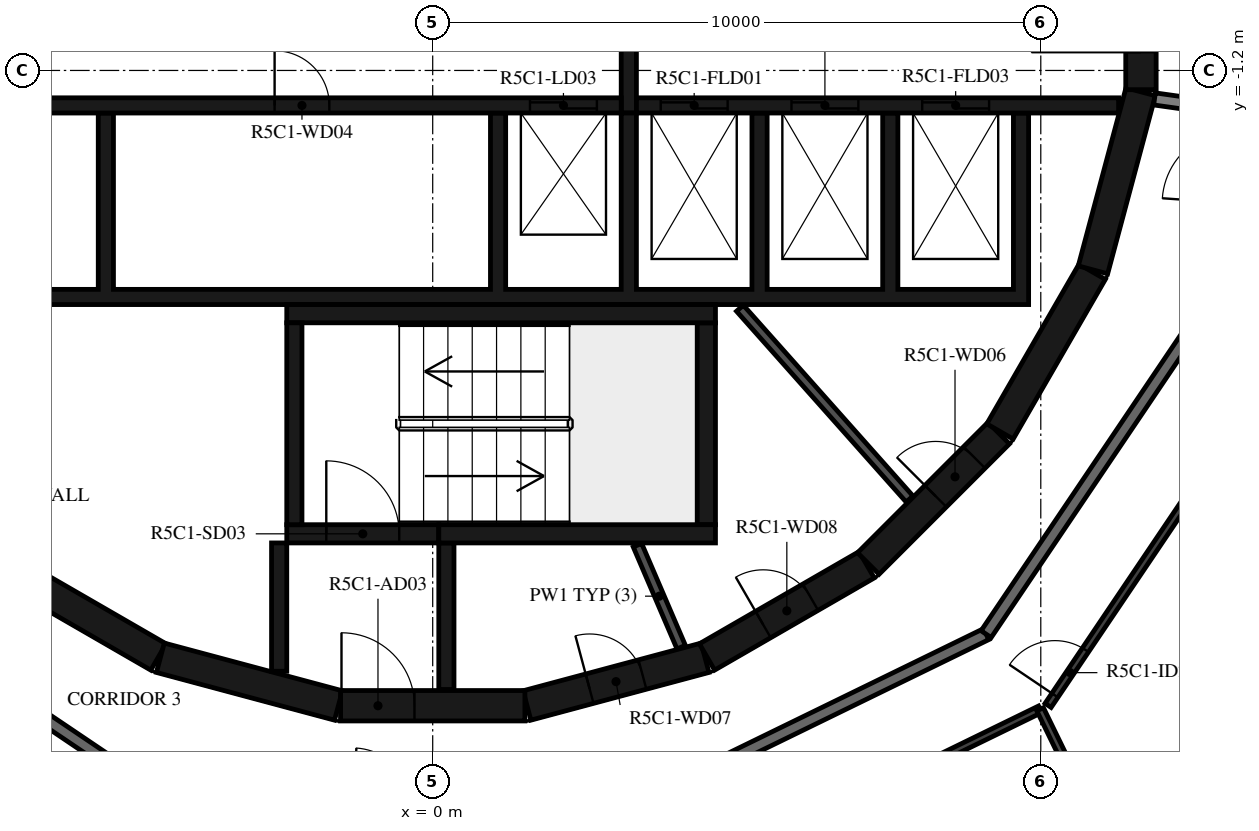
"""IFC4 building model, lengths in metres.
Left out: names, types, materials, properties, quantities, classifications, styles, units other than length and angle.
Written with IfcOpenShell. Run it as: python <this file> out.ifc"""

import sys

from ifc_helpers import new_model, si_unit, direction, frame, frame_2d, origin, place, context, subcontext, project, spatial, polyline, rectangle, outline, extrude, element, fill, save


model = new_model("IFC4")
c1 = context("Model", 3, precision=1e-05, world=origin(), true_north=direction((0.0, 1.0)))
c2 = subcontext(c1, "Body", "Model", "MODEL_VIEW")
j1 = project(units=[si_unit("LENGTHUNIT", "METRE"), si_unit("PLANEANGLEUNIT", "RADIAN")], contexts=[c1])
p1 = place(None, origin())
s1 = spatial("IfcSite", under=j1, at=p1, CompositionType="ELEMENT")
p2 = place(p1, origin())
s2 = spatial("IfcBuilding", under=s1, at=p2, CompositionType="ELEMENT")
p3 = place(p2, frame((0.0, 0.0, 212.9)))
s3 = spatial("IfcBuildingStorey", under=s2, at=p3, CompositionType="ELEMENT", Elevation=212.9)
p4 = place(p3, frame((1.55, -11.643, 0.0), z_axis=(0.0, 0.0, 1.0), x_axis=(0.965948410781, 0.258734743916, 0.0)))
e1 = element("IfcWall", 1, at=p4, inside=s3, PredefinedType="SHEAR", context=c2, shape_type="SweptSolid", body=[
    extrude(rectangle(XDim=3.033, YDim=0.5, at=frame_2d((1.516, 0.0))), origin(), (0.0, 0.0, 1.0), 3.12),
])
p5 = place(p4, frame((1.066, 0.0, 0.0)))
e2 = element("IfcOpeningElement", 2, at=p5, cuts=e1, PredefinedType="OPENING", context=c2, shape_type="SweptSolid", body=[
    extrude(rectangle(XDim=0.9, YDim=2.1, at=frame_2d((0.45, 1.05))), frame((0.0, 0.26, 0.0), z_axis=(0.0, -1.0, 0.0), x_axis=(1.0, 0.0, 0.0)), (0.0, 0.0, 1.0), 0.52),
])
p6 = place(p3, frame((4.51, -10.845, 0.0), z_axis=(0.0, 0.0, 1.0), x_axis=(0.865975092491, 0.500087131594, 0.0)))
e3 = element("IfcWall", 3, at=p6, inside=s3, PredefinedType="SHEAR", context=c2, shape_type="SweptSolid", body=[
    extrude(rectangle(XDim=3.033, YDim=0.5, at=frame_2d((1.516, 0.0))), origin(), (0.0, 0.0, 1.0), 3.12),
])
p7 = place(p6, frame((1.066, 0.0, 0.0)))
e4 = element("IfcOpeningElement", 4, at=p7, cuts=e3, PredefinedType="OPENING", context=c2, shape_type="SweptSolid", body=[
    extrude(rectangle(XDim=0.9, YDim=2.1, at=frame_2d((0.45, 1.05))), frame((0.0, 0.26, 0.0), z_axis=(0.0, -1.0, 0.0), x_axis=(1.0, 0.0, 0.0)), (0.0, 0.0, 1.0), 0.52),
])
p8 = place(p3, frame((7.164, -9.308, 0.0), z_axis=(0.0, 0.0, 1.0), x_axis=(0.707106781187, 0.707106781187, 0.0)))
e5 = element("IfcWall", 5, at=p8, inside=s3, PredefinedType="SHEAR", context=c2, shape_type="SweptSolid", body=[
    extrude(rectangle(XDim=3.032, YDim=0.5, at=frame_2d((1.516, 0.0))), origin(), (0.0, 0.0, 1.0), 3.12),
])
p9 = place(p8, frame((1.566, 0.0, 0.0)))
e6 = element("IfcOpeningElement", 6, at=p9, cuts=e5, PredefinedType="OPENING", context=c2, shape_type="SweptSolid", body=[
    extrude(rectangle(XDim=0.9, YDim=2.1, at=frame_2d((0.45, 1.05))), frame((0.0, 0.26, 0.0), z_axis=(0.0, -1.0, 0.0), x_axis=(1.0, 0.0, 0.0)), (0.0, 0.0, 1.0), 0.52),
])
for number, where, z_axis, x_axis in (
    (7, (9.329, -7.137, 0.0), (0.0, 0.0, 1.0), (0.5, 0.866, 0.0)),
    (8, (10.858, -4.479, 0.0), (0.0, 0.0, 1.0), (0.259, 0.966, 0.0)),
):
    element("IfcWall", number, at=place(p3, frame(where, z_axis=z_axis, x_axis=x_axis)), inside=s3, PredefinedType="SHEAR", context=c2, shape_type="SweptSolid", body=[
        extrude(rectangle(XDim=3.033, YDim=0.5, at=frame_2d((1.516, 0.0))), origin(), (0.0, 0.0, 1.0), 3.12),
    ])
p10 = place(p3, frame((11.647, -1.516, 0.0), z_axis=(0.0, 0.0, 1.0), x_axis=(0.0, 1.0, 0.0)))
e9 = element("IfcWall", 9, at=p10, inside=s3, PredefinedType="SHEAR", context=c2, shape_type="SweptSolid", body=[
    extrude(rectangle(XDim=3.033, YDim=0.5, at=frame_2d((1.516, 0.0))), origin(), (0.0, 0.0, 1.0), 3.12),
])
p11 = place(p10, frame((0.616, 0.0, 0.0)))
e10 = element("IfcOpeningElement", 10, at=p11, cuts=e9, PredefinedType="OPENING", context=c2, shape_type="SweptSolid", body=[
    extrude(rectangle(XDim=1.8, YDim=2.1, at=frame_2d((0.9, 1.05))), frame((0.0, 0.26, 0.0), z_axis=(0.0, -1.0, 0.0), x_axis=(1.0, 0.0, 0.0)), (0.0, 0.0, 1.0), 0.52),
])
for number, where, z_axis, x_axis in (
    (11, (-7.137, -9.329, 0.0), (0.0, 0.0, 1.0), (0.866, -0.5, 0.0)),
    (12, (-4.479, -10.858, 0.0), (0.0, 0.0, 1.0), (0.966, -0.259, 0.0)),
):
    element("IfcWall", number, at=place(p3, frame(where, z_axis=z_axis, x_axis=x_axis)), inside=s3, PredefinedType="SHEAR", context=c2, shape_type="SweptSolid", body=[
        extrude(rectangle(XDim=3.033, YDim=0.5, at=frame_2d((1.516, 0.0))), origin(), (0.0, 0.0, 1.0), 3.12),
    ])
p12 = place(p3, frame((-1.516, -11.647, 0.0), z_axis=(0.0, 0.0, 1.0), x_axis=(1.0, 0.0, 0.0)))
e13 = element("IfcWall", 13, at=p12, inside=s3, PredefinedType="SHEAR", context=c2, shape_type="SweptSolid", body=[
    extrude(rectangle(XDim=3.033, YDim=0.5, at=frame_2d((1.516, 0.0))), origin(), (0.0, 0.0, 1.0), 3.12),
])
p13 = place(p12, frame((0.016, 0.0, 0.0)))
e14 = element("IfcOpeningElement", 14, at=p13, cuts=e13, PredefinedType="OPENING", context=c2, shape_type="SweptSolid", body=[
    extrude(rectangle(XDim=1.2, YDim=2.1, at=frame_2d((0.6, 1.05))), frame((0.0, 0.26, 0.0), z_axis=(0.0, -1.0, 0.0), x_axis=(1.0, 0.0, 0.0)), (0.0, 0.0, 1.0), 0.52),
])
p14 = place(p3, frame((-2.275, -8.67, 0.0), z_axis=(0.0, 0.0, 1.0), x_axis=(0.0, 1.0, 0.0)))
e15 = element("IfcWall", 15, at=p14, inside=s3, PredefinedType="SHEAR", context=c2, shape_type="SweptSolid", body=[
    extrude(rectangle(XDim=3.32, YDim=0.25, at=frame_2d((1.66, 0.0))), origin(), (0.0, 0.0, 1.0), 3.12),
])
p15 = place(p3, frame((-2.4, -5.2, 0.0), z_axis=(0.0, 0.0, 1.0), x_axis=(1.0, 0.0, 0.0)))
e16 = element("IfcWall", 16, at=p15, inside=s3, PredefinedType="SHEAR", context=c2, shape_type="SweptSolid", body=[
    extrude(rectangle(XDim=7.05, YDim=0.3, at=frame_2d((3.525, 0.0))), origin(), (0.0, 0.0, 1.0), 3.12),
])
p16 = place(p3, frame((4.5, -8.67, 0.0), z_axis=(0.0, 0.0, 1.0), x_axis=(0.0, 1.0, 0.0)))
e17 = element("IfcWall", 17, at=p16, inside=s3, PredefinedType="SHEAR", context=c2, shape_type="SweptSolid", body=[
    extrude(rectangle(XDim=3.32, YDim=0.3, at=frame_2d((1.66, 0.0))), origin(), (0.0, 0.0, 1.0), 3.12),
])
p17 = place(p3, frame((0.1, -8.82, 0.0), z_axis=(0.0, 0.0, 1.0), x_axis=(1.0, 0.0, 0.0)))
e18 = element("IfcWall", 18, at=p17, inside=s3, PredefinedType="SHEAR", context=c2, shape_type="SweptSolid", body=[
    extrude(rectangle(XDim=4.55, YDim=0.3, at=frame_2d((2.275, 0.0))), origin(), (0.0, 0.0, 1.0), 3.12),
])
p18 = place(p3, frame((-2.4, -8.82, 0.0), z_axis=(0.0, 0.0, 1.0), x_axis=(1.0, 0.0, 0.0)))
e19 = element("IfcWall", 19, at=p18, inside=s3, PredefinedType="SHEAR", context=c2, shape_type="SweptSolid", body=[
    extrude(rectangle(XDim=2.5, YDim=0.3, at=frame_2d((1.25, 0.0))), origin(), (0.0, 0.0, 1.0), 3.12),
])
p19 = place(p18, frame((0.65, 0.0, 0.0)))
e20 = element("IfcOpeningElement", 20, at=p19, cuts=e19, PredefinedType="OPENING", context=c2, shape_type="SweptSolid", body=[
    extrude(rectangle(XDim=1.2, YDim=2.1, at=frame_2d((0.6, 1.05))), frame((0.0, 0.16, 0.0), z_axis=(0.0, -1.0, 0.0), x_axis=(1.0, 0.0, 0.0)), (0.0, 0.0, 1.0), 0.32),
])
p20 = place(p3, frame((-2.525, -8.97, 0.0), z_axis=(0.0, 0.0, 1.0), x_axis=(0.0, -1.0, 0.0)))
e21 = element("IfcWall", 21, at=p20, inside=s3, PredefinedType="SHEAR", context=c2, shape_type="SweptSolid", body=[
    extrude(rectangle(XDim=2.11, YDim=0.25, at=frame_2d((1.055, 0.0))), origin(), (0.0, 0.0, 1.0), 3.12),
])
p21 = place(p3, frame((0.225, -8.97, 0.0), z_axis=(0.0, 0.0, 1.0), x_axis=(0.0, -1.0, 0.0)))
e22 = element("IfcWall", 22, at=p21, inside=s3, PredefinedType="SHEAR", context=c2, shape_type="SweptSolid", body=[
    extrude(rectangle(XDim=2.41, YDim=0.25, at=frame_2d((1.205, 0.0))), origin(), (0.0, 0.0, 1.0), 3.12),
])
p22 = place(p3, origin())
e23 = element("IfcWall", 23, at=p22, inside=s3, PredefinedType="SHEAR", context=c2, shape_type="SweptSolid", body=[
    extrude(outline(polyline([(9.8, -5.05), (9.8, -4.8), (9.8, -1.9), (9.55, -1.9), (9.55, -4.8), (7.65, -4.8), (7.65, -1.9), (7.4, -1.9), (7.4, -4.8), (5.5, -4.8), (5.5, -1.9), (5.25, -1.9), (5.25, -4.8), (3.35, -4.8), (3.35, -1.9), (3.1, -1.9), (3.1, -4.8), (1.2, -4.8), (1.2, -1.9), (0.95, -1.9), (0.95, -4.8), (-5.25, -4.8), (-5.25, -1.9), (-5.5, -1.9), (-5.5, -4.8), (-7.4, -4.8), (-7.4, -1.9), (-7.65, -1.9), (-7.65, -4.8), (-9.55, -4.8), (-9.55, -1.9), (-9.8, -1.9), (-9.8, -4.8), (-9.8, -5.05), (9.8, -5.05)])), origin(), (0.0, 0.0, 1.0), 3.12),
])
p23 = place(p3, frame((-11.28, -1.775, 0.0), z_axis=(0.0, 0.0, 1.0), x_axis=(1.0, 0.0, 0.0)))
e24 = element("IfcWall", 24, at=p23, inside=s3, PredefinedType="SHEAR", context=c2, shape_type="SweptSolid", body=[
    extrude(rectangle(XDim=14.38, YDim=0.25, at=frame_2d((7.19, 0.0))), origin(), (0.0, 0.0, 1.0), 3.12),
])
p24 = place(p23, frame((12.88, 0.0, 0.0)))
e25 = element("IfcOpeningElement", 25, at=p24, cuts=e24, PredefinedType="OPENING", context=c2, shape_type="SweptSolid", body=[
    extrude(rectangle(XDim=1.1, YDim=2.1, at=frame_2d((0.55, 1.05))), frame((0.0, 0.135, 0.0), z_axis=(0.0, -1.0, 0.0), x_axis=(1.0, 0.0, 0.0)), (0.0, 0.0, 1.0), 0.27),
])
p25 = place(p23, frame((8.68, 0.0, 0.0)))
e26 = element("IfcOpeningElement", 26, at=p25, cuts=e24, PredefinedType="OPENING", context=c2, shape_type="SweptSolid", body=[
    extrude(rectangle(XDim=0.9, YDim=2.1, at=frame_2d((0.45, 1.05))), frame((0.0, 0.135, 0.0), z_axis=(0.0, -1.0, 0.0), x_axis=(1.0, 0.0, 0.0)), (0.0, 0.0, 1.0), 0.27),
])
p26 = place(p3, frame((3.35, -1.775, 0.0), z_axis=(0.0, 0.0, 1.0), x_axis=(1.0, 0.0, 0.0)))
e27 = element("IfcWall", 27, at=p26, inside=s3, PredefinedType="SHEAR", context=c2, shape_type="SweptSolid", body=[
    extrude(rectangle(XDim=7.93, YDim=0.25, at=frame_2d((3.965, 0.0))), origin(), (0.0, 0.0, 1.0), 3.12),
])
p27 = place(p26, frame((0.4, 0.0, 0.0)))
e28 = element("IfcOpeningElement", 28, at=p27, cuts=e27, PredefinedType="OPENING", context=c2, shape_type="SweptSolid", body=[
    extrude(rectangle(XDim=1.1, YDim=2.4, at=frame_2d((0.55, 1.2))), frame((0.0, 0.135, 0.0), z_axis=(0.0, -1.0, 0.0), x_axis=(1.0, 0.0, 0.0)), (0.0, 0.0, 1.0), 0.27),
])
p28 = place(p26, frame((2.55, 0.0, 0.0)))
e29 = element("IfcOpeningElement", 29, at=p28, cuts=e27, PredefinedType="OPENING", context=c2, shape_type="SweptSolid", body=[
    extrude(rectangle(XDim=1.1, YDim=2.4, at=frame_2d((0.55, 1.2))), frame((0.0, 0.135, 0.0), z_axis=(0.0, -1.0, 0.0), x_axis=(1.0, 0.0, 0.0)), (0.0, 0.0, 1.0), 0.27),
])
p29 = place(p26, frame((4.7, 0.0, 0.0)))
e30 = element("IfcOpeningElement", 30, at=p29, cuts=e27, PredefinedType="OPENING", context=c2, shape_type="SweptSolid", body=[
    extrude(rectangle(XDim=1.1, YDim=2.4, at=frame_2d((0.55, 1.2))), frame((0.0, 0.135, 0.0), z_axis=(0.0, -1.0, 0.0), x_axis=(1.0, 0.0, 0.0)), (0.0, 0.0, 1.0), 0.27),
])
p30 = place(p3, frame((3.225, -1.9, 0.0), z_axis=(0.0, 0.0, 1.0), x_axis=(0.0, 1.0, 0.0)))
e31 = element("IfcWall", 31, at=p30, inside=s3, PredefinedType="SHEAR", context=c2, shape_type="SweptSolid", body=[
    extrude(rectangle(XDim=3.8, YDim=0.25, at=frame_2d((1.9, 0.0))), origin(), (0.0, 0.0, 1.0), 3.12),
])
p31 = place(p3, frame((7.842, -8.248, 0.0), z_axis=(0.0, 0.0, 1.0), x_axis=(-0.66446128181, 0.747322691329, 0.0)))
e32 = element("IfcWall", 32, at=p31, inside=s3, PredefinedType="PARTITIONING", context=c2, shape_type="SweptSolid", body=[
    extrude(rectangle(XDim=4.198, YDim=0.15, at=frame_2d((2.099, 0.0))), origin(), (0.0, 0.0, 1.0), 3.12),
])
p32 = place(p3, frame((3.367, -9.007, 0.0), z_axis=(0.0, 0.0, 1.0), x_axis=(0.394387482265, -0.918944238696, 0.0)))
e33 = element("IfcWall", 33, at=p32, inside=s3, PredefinedType="PARTITIONING", context=c2, shape_type="SweptSolid", body=[
    extrude(rectangle(XDim=1.825, YDim=0.15, at=frame_2d((0.913, 0.0))), origin(), (0.0, 0.0, 1.0), 3.12),
])
p33 = place(p3, frame((13.302, -1.869, 0.0), z_axis=(0.0, 0.0, 1.0), x_axis=(-0.990274397042, 0.13912806533, 0.0)))
e34 = element("IfcWall", 34, at=p33, inside=s3, PredefinedType="STANDARD", context=c2, shape_type="SweptSolid", body=[
    extrude(rectangle(XDim=1.446, YDim=0.2, at=frame_2d((0.723, 0.0))), origin(), (0.0, 0.0, 1.0), 3.12),
])
p34 = place(p3, frame((-10.47, -9.101, 0.0), z_axis=(0.0, 0.0, 1.0), x_axis=(0.829035841718, -0.559195469534, 0.0)))
e35 = element("IfcWall", 35, at=p34, inside=s3, PredefinedType="STANDARD", context=c2, shape_type="SweptSolid", body=[
    extrude(rectangle(XDim=7.181, YDim=0.2, at=frame_2d((3.591, 0.0))), origin(), (0.0, 0.0, 1.0), 3.12),
])
p35 = place(p34, frame((2.39, 0.0, 0.0)))
e36 = element("IfcOpeningElement", 36, at=p35, cuts=e35, PredefinedType="OPENING", context=c2, shape_type="SweptSolid", body=[
    extrude(rectangle(XDim=1.0, YDim=2.1, at=frame_2d((0.5, 1.05))), frame((0.0, 0.11, 0.0), z_axis=(0.0, -1.0, 0.0), x_axis=(1.0, 0.0, 0.0)), (0.0, 0.0, 1.0), 0.22),
])
p36 = place(p3, frame((2.647, -13.618, 0.0), z_axis=(0.0, 0.0, 1.0), x_axis=(0.898796543751, 0.438366026218, 0.0)))
e37 = element("IfcWall", 37, at=p36, inside=s3, PredefinedType="STANDARD", context=c2, shape_type="SweptSolid", body=[
    extrude(rectangle(XDim=7.181, YDim=0.2, at=frame_2d((3.591, 0.0))), origin(), (0.0, 0.0, 1.0), 3.12),
])
p37 = place(p36, frame((0.2, 0.0, 0.0)))
e38 = element("IfcOpeningElement", 38, at=p37, cuts=e37, PredefinedType="OPENING", context=c2, shape_type="SweptSolid", body=[
    extrude(rectangle(XDim=1.0, YDim=2.1, at=frame_2d((0.5, 1.05))), frame((0.0, 0.11, 0.0), z_axis=(0.0, -1.0, 0.0), x_axis=(1.0, 0.0, 0.0)), (0.0, 0.0, 1.0), 0.22),
])
p38 = place(p3, frame((9.101, -10.47, 0.0), z_axis=(0.0, 0.0, 1.0), x_axis=(0.559195469534, 0.829035841718, 0.0)))
e39 = element("IfcWall", 39, at=p38, inside=s3, PredefinedType="STANDARD", context=c2, shape_type="SweptSolid", body=[
    extrude(rectangle(XDim=7.181, YDim=0.2, at=frame_2d((3.591, 0.0))), origin(), (0.0, 0.0, 1.0), 3.12),
])
p39 = place(p3, frame((-11.642, -10.12, 0.0), z_axis=(0.0, 0.0, 1.0), x_axis=(0.829029427133, -0.559204979365, 0.0)))
e40 = element("IfcWall", 40, at=p39, inside=s3, PredefinedType="PARTITIONING", context=c2, shape_type="SweptSolid", body=[
    extrude(rectangle(XDim=6.904, YDim=0.12, at=frame_2d((3.452, 0.0))), origin(), (0.0, 0.0, 1.0), 3.12),
])
p40 = place(p39, frame((0.2, 0.0, 0.0)))
e41 = element("IfcOpeningElement", 41, at=p40, cuts=e40, PredefinedType="OPENING", context=c2, shape_type="SweptSolid", body=[
    extrude(rectangle(XDim=0.9, YDim=2.1, at=frame_2d((0.45, 1.05))), frame((0.0, 0.07, 0.0), z_axis=(0.0, -1.0, 0.0), x_axis=(1.0, 0.0, 0.0)), (0.0, 0.0, 1.0), 0.14),
])
p41 = place(p39, frame((4.192, 0.0, 0.0)))
e42 = element("IfcOpeningElement", 42, at=p41, cuts=e40, PredefinedType="OPENING", context=c2, shape_type="SweptSolid", body=[
    extrude(rectangle(XDim=0.9, YDim=2.1, at=frame_2d((0.45, 1.05))), frame((0.0, 0.07, 0.0), z_axis=(0.0, -1.0, 0.0), x_axis=(1.0, 0.0, 0.0)), (0.0, 0.0, 1.0), 0.14),
])
p42 = place(p3, frame((3.074, -15.078, 0.0), z_axis=(0.0, 0.0, 1.0), x_axis=(0.898800770739, 0.438357359377, 0.0)))
e43 = element("IfcWall", 43, at=p42, inside=s3, PredefinedType="PARTITIONING", context=c2, shape_type="SweptSolid", body=[
    extrude(rectangle(XDim=7.694, YDim=0.12, at=frame_2d((3.847, 0.0))), origin(), (0.0, 0.0, 1.0), 3.12),
])
p43 = place(p42, frame((0.2, 0.0, 0.0)))
e44 = element("IfcOpeningElement", 44, at=p43, cuts=e43, PredefinedType="OPENING", context=c2, shape_type="SweptSolid", body=[
    extrude(rectangle(XDim=0.9, YDim=2.1, at=frame_2d((0.45, 1.05))), frame((0.0, 0.07, 0.0), z_axis=(0.0, -1.0, 0.0), x_axis=(1.0, 0.0, 0.0)), (0.0, 0.0, 1.0), 0.14),
])
p44 = place(p3, frame((10.12, -11.642, 0.0), z_axis=(0.0, 0.0, 1.0), x_axis=(0.559201404667, 0.829031838362, 0.0)))
e45 = element("IfcWall", 45, at=p44, inside=s3, PredefinedType="PARTITIONING", context=c2, shape_type="SweptSolid", body=[
    extrude(rectangle(XDim=7.709, YDim=0.12, at=frame_2d((3.854, 0.0))), origin(), (0.0, 0.0, 1.0), 3.12),
])
p45 = place(p44, frame((0.2, 0.0, 0.0)))
e46 = element("IfcOpeningElement", 46, at=p45, cuts=e45, PredefinedType="OPENING", context=c2, shape_type="SweptSolid", body=[
    extrude(rectangle(XDim=0.9, YDim=2.1, at=frame_2d((0.45, 1.05))), frame((0.0, 0.07, 0.0), z_axis=(0.0, -1.0, 0.0), x_axis=(1.0, 0.0, 0.0)), (0.0, 0.0, 1.0), 0.14),
])
p46 = place(p3, frame((11.427, -14.654, 0.0), z_axis=(0.0, 0.0, 1.0), x_axis=(-0.438410435857, 0.898774882677, 0.0)))
e47 = element("IfcWall", 47, at=p46, inside=s3, PredefinedType="PARTITIONING", context=c2, shape_type="SweptSolid", body=[
    extrude(rectangle(XDim=3.281, YDim=0.12, at=frame_2d((1.64, 0.0))), origin(), (0.0, 0.0, 1.0), 2.73),
])
p47 = place(p19, origin())
e48 = element("IfcDoor", 48, at=p47, inside=s3, OperationType="SINGLE_SWING_LEFT", PredefinedType="DOOR", context=c2, shape_type="SweptSolid", body=[
    extrude(rectangle(XDim=1.2, YDim=2.1, at=frame_2d((0.6, 1.05))), frame((0.0, 0.025, 0.0), z_axis=(0.0, -1.0, 0.0), x_axis=(1.0, 0.0, 0.0)), (0.0, 0.0, 1.0), 0.05),
])
fill(e20, e48)
p48 = place(p13, origin())
e49 = element("IfcDoor", 49, at=p48, inside=s3, OperationType="SINGLE_SWING_RIGHT", PredefinedType="DOOR", context=c2, shape_type="SweptSolid", body=[
    extrude(rectangle(XDim=1.2, YDim=2.1, at=frame_2d((0.6, 1.05))), frame((0.0, 0.025, 0.0), z_axis=(0.0, -1.0, 0.0), x_axis=(1.0, 0.0, 0.0)), (0.0, 0.0, 1.0), 0.05),
])
fill(e14, e49)
p49 = place(p11, origin())
e50 = element("IfcDoor", 50, at=p49, inside=s3, OperationType="DOUBLE_DOOR_SINGLE_SWING", PredefinedType="DOOR", context=c2, shape_type="SweptSolid", body=[
    extrude(rectangle(XDim=1.8, YDim=2.1, at=frame_2d((0.9, 1.05))), frame((0.0, 0.025, 0.0), z_axis=(0.0, -1.0, 0.0), x_axis=(1.0, 0.0, 0.0)), (0.0, 0.0, 1.0), 0.05),
])
fill(e10, e50)
p50 = place(p24, origin())
e51 = element("IfcDoor", 51, at=p50, inside=s3, OperationType="DOUBLE_DOOR_SLIDING", PredefinedType="DOOR", context=c2, shape_type="SweptSolid", body=[
    extrude(rectangle(XDim=1.1, YDim=2.1, at=frame_2d((0.55, 1.05))), frame((0.0, 0.025, 0.0), z_axis=(0.0, -1.0, 0.0), x_axis=(1.0, 0.0, 0.0)), (0.0, 0.0, 1.0), 0.05),
])
fill(e25, e51)
p51 = place(p27, origin())
e52 = element("IfcDoor", 52, at=p51, inside=s3, OperationType="DOUBLE_DOOR_SLIDING", PredefinedType="DOOR", context=c2, shape_type="SweptSolid", body=[
    extrude(rectangle(XDim=1.1, YDim=2.4, at=frame_2d((0.55, 1.2))), frame((0.0, 0.025, 0.0), z_axis=(0.0, -1.0, 0.0), x_axis=(1.0, 0.0, 0.0)), (0.0, 0.0, 1.0), 0.05),
])
fill(e28, e52)
p52 = place(p28, origin())
e53 = element("IfcDoor", 53, at=p52, inside=s3, OperationType="DOUBLE_DOOR_SLIDING", PredefinedType="DOOR", context=c2, shape_type="SweptSolid", body=[
    extrude(rectangle(XDim=1.1, YDim=2.4, at=frame_2d((0.55, 1.2))), frame((0.0, 0.025, 0.0), z_axis=(0.0, -1.0, 0.0), x_axis=(1.0, 0.0, 0.0)), (0.0, 0.0, 1.0), 0.05),
])
fill(e29, e53)
p53 = place(p29, origin())
e54 = element("IfcDoor", 54, at=p53, inside=s3, OperationType="DOUBLE_DOOR_SLIDING", PredefinedType="DOOR", context=c2, shape_type="SweptSolid", body=[
    extrude(rectangle(XDim=1.1, YDim=2.4, at=frame_2d((0.55, 1.2))), frame((0.0, 0.025, 0.0), z_axis=(0.0, -1.0, 0.0), x_axis=(1.0, 0.0, 0.0)), (0.0, 0.0, 1.0), 0.05),
])
fill(e30, e54)
p54 = place(p25, origin())
e55 = element("IfcDoor", 55, at=p54, inside=s3, OperationType="SINGLE_SWING_RIGHT", PredefinedType="DOOR", context=c2, shape_type="SweptSolid", body=[
    extrude(rectangle(XDim=0.9, YDim=2.1, at=frame_2d((0.45, 1.05))), frame((0.0, 0.025, 0.0), z_axis=(0.0, -1.0, 0.0), x_axis=(1.0, 0.0, 0.0)), (0.0, 0.0, 1.0), 0.05),
])
fill(e26, e55)
p55 = place(p9, origin())
e56 = element("IfcDoor", 56, at=p55, inside=s3, OperationType="SINGLE_SWING_RIGHT", PredefinedType="DOOR", context=c2, shape_type="SweptSolid", body=[
    extrude(rectangle(XDim=0.9, YDim=2.1, at=frame_2d((0.45, 1.05))), frame((0.0, 0.025, 0.0), z_axis=(0.0, -1.0, 0.0), x_axis=(1.0, 0.0, 0.0)), (0.0, 0.0, 1.0), 0.05),
])
fill(e6, e56)
p56 = place(p5, origin())
e57 = element("IfcDoor", 57, at=p56, inside=s3, OperationType="SINGLE_SWING_LEFT", PredefinedType="DOOR", context=c2, shape_type="SweptSolid", body=[
    extrude(rectangle(XDim=0.9, YDim=2.1, at=frame_2d((0.45, 1.05))), frame((0.0, 0.025, 0.0), z_axis=(0.0, -1.0, 0.0), x_axis=(1.0, 0.0, 0.0)), (0.0, 0.0, 1.0), 0.05),
])
fill(e2, e57)
p57 = place(p7, origin())
e58 = element("IfcDoor", 58, at=p57, inside=s3, OperationType="SINGLE_SWING_RIGHT", PredefinedType="DOOR", context=c2, shape_type="SweptSolid", body=[
    extrude(rectangle(XDim=0.9, YDim=2.1, at=frame_2d((0.45, 1.05))), frame((0.0, 0.025, 0.0), z_axis=(0.0, -1.0, 0.0), x_axis=(1.0, 0.0, 0.0)), (0.0, 0.0, 1.0), 0.05),
])
fill(e4, e58)
p58 = place(p45, origin())
e59 = element("IfcDoor", 59, at=p58, inside=s3, OperationType="SINGLE_SWING_RIGHT", PredefinedType="DOOR", context=c2, shape_type="SweptSolid", body=[
    extrude(rectangle(XDim=0.9, YDim=2.1, at=frame_2d((0.45, 1.05))), frame((0.0, 0.025, 0.0), z_axis=(0.0, -1.0, 0.0), x_axis=(1.0, 0.0, 0.0)), (0.0, 0.0, 1.0), 0.05),
])
fill(e46, e59)
save(model, sys.argv[1])
